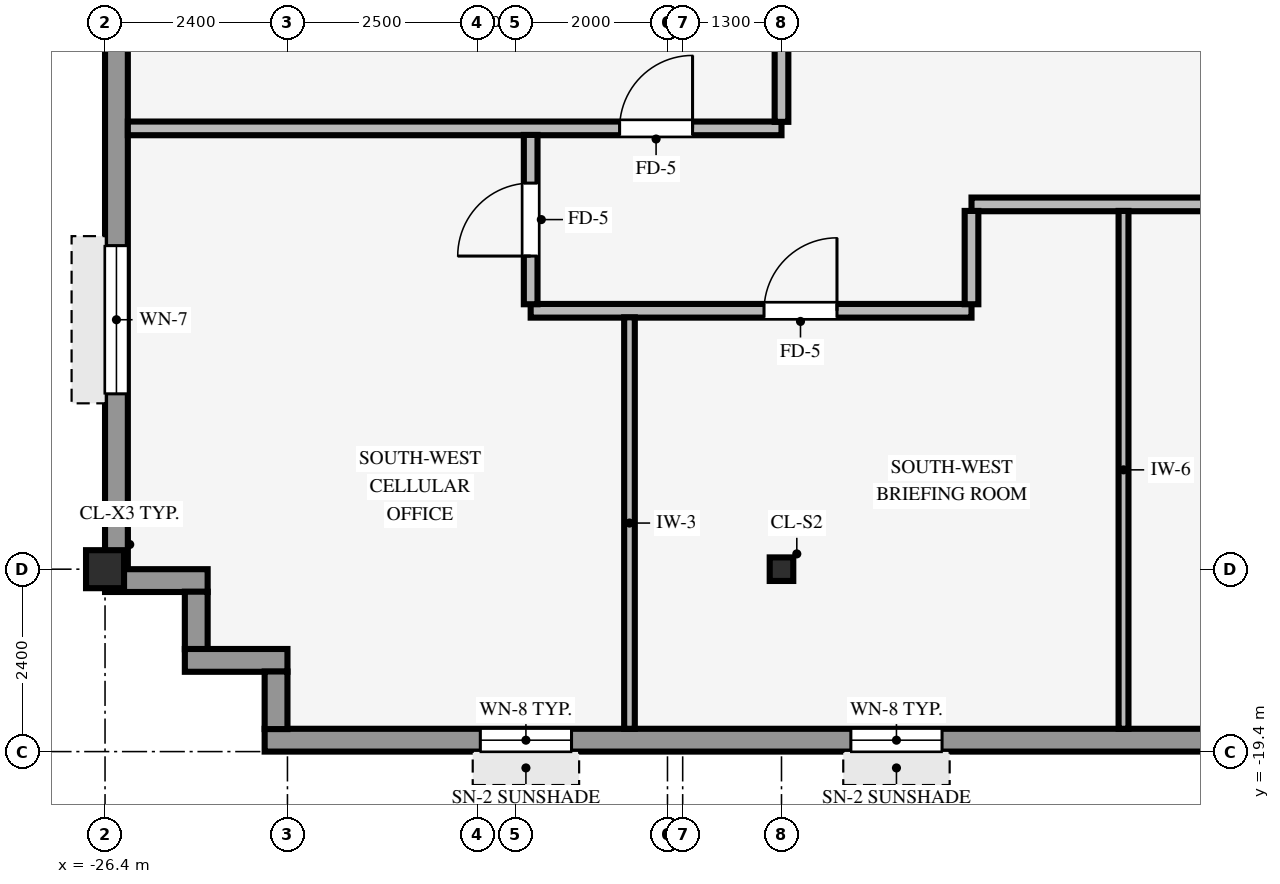
"""IFC4 building model, lengths in metres.
Left out: names, types, materials, properties, quantities, classifications, styles, units other than length and angle.
Written with IfcOpenShell. Run it as: python <this file> out.ifc"""

import sys

from ifc_helpers import new_model, si_unit, direction, frame, frame_2d, origin, origin_2d, place, context, subcontext, project, spatial, rectangle, hollow_rectangle, i_section, extrude, source, transform, mapped, element, fill, save


model = new_model("IFC4")
c1 = context("Model", 3, precision=1e-05, world=origin(), true_north=direction((0.0, 1.0)))
c2 = subcontext(c1, "Body", "Model", "MODEL_VIEW")
j1 = project(units=[si_unit("LENGTHUNIT", "METRE"), si_unit("PLANEANGLEUNIT", "RADIAN")], contexts=[c1])
p1 = place(None, origin())
s1 = spatial("IfcSite", under=j1, at=p1, CompositionType="ELEMENT")
p2 = place(p1, origin())
s2 = spatial("IfcBuilding", under=s1, at=p2, CompositionType="ELEMENT")
p3 = place(p2, frame((0.0, 0.0, 238.35)))
s3 = spatial("IfcBuildingStorey", under=s2, at=p3, CompositionType="ELEMENT", Elevation=238.35)
p4 = place(p3, frame((-26.4, -17.0, 0.0), z_axis=(0.0, 0.0, 1.0), x_axis=(1.0, 0.0, 0.0)))
e1 = element("IfcColumn", 1, at=p4, inside=s3, PredefinedType="COLUMN", context=c2, shape_type="SweptSolid", body=[
    extrude(hollow_rectangle(XDim=0.5, YDim=0.5, WallThickness=0.032, InnerFilletRadius=0.032, OuterFilletRadius=0.064, at=origin_2d()), origin(), (0.0, 0.0, 1.0), 3.37),
])
p5 = place(p3, frame((-17.5, -17.0, 0.0), z_axis=(0.0, 0.0, 1.0), x_axis=(1.0, 0.0, 0.0)))
e2 = element("IfcColumn", 2, at=p5, inside=s3, PredefinedType="COLUMN", context=c2, shape_type="SweptSolid", body=[
    extrude(i_section(OverallWidth=0.31, OverallDepth=0.31, WebThickness=0.015, FlangeThickness=0.015, FilletRadius=0.015, at=origin_2d()), origin(), (0.0, 0.0, 1.0), 3.37),
])
p6 = place(p3, frame((-24.3, -19.25, 0.0), z_axis=(0.0, 0.0, 1.0), x_axis=(1.0, 0.0, 0.0)))
e3 = element("IfcWall", 3, at=p6, inside=s3, PredefinedType="STANDARD", context=c2, shape_type="SweptSolid", body=[
    extrude(rectangle(XDim=41.0, YDim=0.3, at=frame_2d((20.5, 0.0))), origin(), (0.0, 0.0, 1.0), 2.705),
])
p7 = place(p6, frame((2.837, 0.0, 0.8)))
e4 = element("IfcOpeningElement", 4, at=p7, cuts=e3, PredefinedType="OPENING", context=c2, shape_type="SweptSolid", body=[
    extrude(rectangle(XDim=1.2, YDim=1.48, at=frame_2d((0.6, 0.74))), frame((0.0, 0.16, 0.0), z_axis=(0.0, -1.0, 0.0), x_axis=(1.0, 0.0, 0.0)), (0.0, 0.0, 1.0), 0.32),
])
p8 = place(p6, frame((7.712, 0.0, 0.8)))
e5 = element("IfcOpeningElement", 5, at=p8, cuts=e3, PredefinedType="OPENING", context=c2, shape_type="SweptSolid", body=[
    extrude(rectangle(XDim=1.2, YDim=1.48, at=frame_2d((0.6, 0.74))), frame((0.0, 0.16, 0.0), z_axis=(0.0, -1.0, 0.0), x_axis=(1.0, 0.0, 0.0)), (0.0, 0.0, 1.0), 0.32),
])
p9 = place(p6, frame((12.587, 0.0, 0.8)))
e6 = element("IfcOpeningElement", 6, at=p9, cuts=e3, PredefinedType="OPENING", context=c2, shape_type="SweptSolid", body=[
    extrude(rectangle(XDim=1.2, YDim=1.48, at=frame_2d((0.6, 0.74))), frame((0.0, 0.16, 0.0), z_axis=(0.0, -1.0, 0.0), x_axis=(1.0, 0.0, 0.0)), (0.0, 0.0, 1.0), 0.32),
])
p10 = place(p6, frame((18.363, 0.0, 0.8)))
e7 = element("IfcOpeningElement", 7, at=p10, cuts=e3, PredefinedType="OPENING", context=c2, shape_type="SweptSolid", body=[
    extrude(rectangle(XDim=1.2, YDim=1.48, at=frame_2d((0.6, 0.74))), frame((0.0, 0.16, 0.0), z_axis=(0.0, -1.0, 0.0), x_axis=(1.0, 0.0, 0.0)), (0.0, 0.0, 1.0), 0.32),
])
p11 = place(p6, frame((21.887, 0.0, 0.8)))
e8 = element("IfcOpeningElement", 8, at=p11, cuts=e3, PredefinedType="OPENING", context=c2, shape_type="SweptSolid", body=[
    extrude(rectangle(XDim=1.2, YDim=1.48, at=frame_2d((0.6, 0.74))), frame((0.0, 0.16, 0.0), z_axis=(0.0, -1.0, 0.0), x_axis=(1.0, 0.0, 0.0)), (0.0, 0.0, 1.0), 0.32),
])
p12 = place(p6, frame((27.212, 0.0, 0.8)))
e9 = element("IfcOpeningElement", 9, at=p12, cuts=e3, PredefinedType="OPENING", context=c2, shape_type="SweptSolid", body=[
    extrude(rectangle(XDim=1.2, YDim=1.48, at=frame_2d((0.6, 0.74))), frame((0.0, 0.16, 0.0), z_axis=(0.0, -1.0, 0.0), x_axis=(1.0, 0.0, 0.0)), (0.0, 0.0, 1.0), 0.32),
])
p13 = place(p6, frame((31.188, 0.0, 0.8)))
e10 = element("IfcOpeningElement", 10, at=p13, cuts=e3, PredefinedType="OPENING", context=c2, shape_type="SweptSolid", body=[
    extrude(rectangle(XDim=1.2, YDim=1.48, at=frame_2d((0.6, 0.74))), frame((0.0, 0.16, 0.0), z_axis=(0.0, -1.0, 0.0), x_axis=(1.0, 0.0, 0.0)), (0.0, 0.0, 1.0), 0.32),
])
p14 = place(p6, frame((36.962, 0.0, 0.8)))
e11 = element("IfcOpeningElement", 11, at=p14, cuts=e3, PredefinedType="OPENING", context=c2, shape_type="SweptSolid", body=[
    extrude(rectangle(XDim=1.2, YDim=1.48, at=frame_2d((0.6, 0.74))), frame((0.0, 0.16, 0.0), z_axis=(0.0, -1.0, 0.0), x_axis=(1.0, 0.0, 0.0)), (0.0, 0.0, 1.0), 0.32),
])
p15 = place(p3, frame((-26.25, -17.004, 0.0), z_axis=(0.0, 0.0, 1.0), x_axis=(0.0, 1.0, 0.0)))
e12 = element("IfcWall", 12, at=p15, inside=s3, PredefinedType="STANDARD", context=c2, shape_type="SweptSolid", body=[
    extrude(rectangle(XDim=34.008, YDim=0.3, at=frame_2d((17.004, 0.0))), origin(), (0.0, 0.0, 1.0), 2.705),
])
p16 = place(p15, frame((2.311, 0.0, 0.8)))
e13 = element("IfcOpeningElement", 13, at=p16, cuts=e12, PredefinedType="OPENING", context=c2, shape_type="SweptSolid", body=[
    extrude(rectangle(XDim=1.95, YDim=1.48, at=frame_2d((0.975, 0.74))), frame((0.0, 0.16, 0.0), z_axis=(0.0, -1.0, 0.0), x_axis=(1.0, 0.0, 0.0)), (0.0, 0.0, 1.0), 0.32),
])
p17 = place(p15, frame((8.234, 0.0, 0.8)))
e14 = element("IfcOpeningElement", 14, at=p17, cuts=e12, PredefinedType="OPENING", context=c2, shape_type="SweptSolid", body=[
    extrude(rectangle(XDim=1.95, YDim=1.48, at=frame_2d((0.975, 0.74))), frame((0.0, 0.16, 0.0), z_axis=(0.0, -1.0, 0.0), x_axis=(1.0, 0.0, 0.0)), (0.0, 0.0, 1.0), 0.32),
])
p18 = place(p15, frame((11.456, 0.0, 0.8)))
e15 = element("IfcOpeningElement", 15, at=p18, cuts=e12, PredefinedType="OPENING", context=c2, shape_type="SweptSolid", body=[
    extrude(rectangle(XDim=1.95, YDim=1.48, at=frame_2d((0.975, 0.74))), frame((0.0, 0.16, 0.0), z_axis=(0.0, -1.0, 0.0), x_axis=(1.0, 0.0, 0.0)), (0.0, 0.0, 1.0), 0.32),
])
p19 = place(p15, frame((20.602, 0.0, 0.8)))
e16 = element("IfcOpeningElement", 16, at=p19, cuts=e12, PredefinedType="OPENING", context=c2, shape_type="SweptSolid", body=[
    extrude(rectangle(XDim=1.95, YDim=1.48, at=frame_2d((0.975, 0.74))), frame((0.0, 0.16, 0.0), z_axis=(0.0, -1.0, 0.0), x_axis=(1.0, 0.0, 0.0)), (0.0, 0.0, 1.0), 0.32),
])
p20 = place(p15, frame((23.824, 0.0, 0.8)))
e17 = element("IfcOpeningElement", 17, at=p20, cuts=e12, PredefinedType="OPENING", context=c2, shape_type="SweptSolid", body=[
    extrude(rectangle(XDim=1.95, YDim=1.48, at=frame_2d((0.975, 0.74))), frame((0.0, 0.16, 0.0), z_axis=(0.0, -1.0, 0.0), x_axis=(1.0, 0.0, 0.0)), (0.0, 0.0, 1.0), 0.32),
])
p21 = place(p15, frame((29.747, 0.0, 0.8)))
e18 = element("IfcOpeningElement", 18, at=p21, cuts=e12, PredefinedType="OPENING", context=c2, shape_type="SweptSolid", body=[
    extrude(rectangle(XDim=1.95, YDim=1.48, at=frame_2d((0.975, 0.74))), frame((0.0, 0.16, 0.0), z_axis=(0.0, -1.0, 0.0), x_axis=(1.0, 0.0, 0.0)), (0.0, 0.0, 1.0), 0.32),
])
p22 = place(p3, frame((-26.4, -17.15, 0.0), z_axis=(0.0, 0.0, 1.0), x_axis=(1.0, 0.0, 0.0)))
e19 = element("IfcWall", 19, at=p22, inside=s3, PredefinedType="STANDARD", context=c2, shape_type="SweptSolid", body=[
    extrude(rectangle(XDim=1.35, YDim=0.3, at=frame_2d((0.675, 0.0))), origin(), (0.0, 0.0, 1.0), 2.892),
])
p23 = place(p3, frame((-25.2, -18.054, 0.0), z_axis=(0.0, 0.0, 1.0), x_axis=(0.0, 1.0, 0.0)))
e20 = element("IfcWall", 20, at=p23, inside=s3, PredefinedType="STANDARD", context=c2, shape_type="SweptSolid", body=[
    extrude(rectangle(XDim=0.758, YDim=0.3, at=frame_2d((0.379, 0.0))), origin(), (0.0, 0.0, 1.0), 2.892),
])
p24 = place(p3, frame((-25.35, -18.2, 0.0), z_axis=(0.0, 0.0, 1.0), x_axis=(1.0, 0.0, 0.0)))
e21 = element("IfcWall", 21, at=p24, inside=s3, PredefinedType="STANDARD", context=c2, shape_type="SweptSolid", body=[
    extrude(rectangle(XDim=1.35, YDim=0.3, at=frame_2d((0.675, 0.0))), origin(), (0.0, 0.0, 1.0), 2.892),
])
p25 = place(p3, frame((-24.15, -19.104, 0.0), z_axis=(0.0, 0.0, 1.0), x_axis=(0.0, 1.0, 0.0)))
e22 = element("IfcWall", 22, at=p25, inside=s3, PredefinedType="STANDARD", context=c2, shape_type="SweptSolid", body=[
    extrude(rectangle(XDim=0.758, YDim=0.3, at=frame_2d((0.379, 0.0))), origin(), (0.0, 0.0, 1.0), 2.892),
])
p26 = place(p3, frame((-20.8, -13.6, 0.0), z_axis=(0.0, 0.0, 1.0), x_axis=(1.0, 0.0, 0.0)))
e23 = element("IfcWall", 23, at=p26, inside=s3, PredefinedType="PARTITIONING", context=c2, shape_type="SweptSolid", body=[
    extrude(rectangle(XDim=5.8, YDim=0.18, at=frame_2d((2.9, 0.0))), origin(), (0.0, 0.0, 1.0), 3.049),
])
p27 = place(p26, frame((3.07, 0.0, 0.0)))
e24 = element("IfcOpeningElement", 24, at=p27, cuts=e23, PredefinedType="OPENING", context=c2, shape_type="SweptSolid", body=[
    extrude(rectangle(XDim=0.96, YDim=2.1, at=frame_2d((0.48, 1.05))), frame((0.0, 0.1, 0.0), z_axis=(0.0, -1.0, 0.0), x_axis=(1.0, 0.0, 0.0)), (0.0, 0.0, 1.0), 0.2),
])
p28 = place(p3, frame((-15.0, -12.2, 0.0), z_axis=(0.0, 0.0, 1.0), x_axis=(1.0, 0.0, 0.0)))
e25 = element("IfcWall", 25, at=p28, inside=s3, PredefinedType="PARTITIONING", context=c2, shape_type="SweptSolid", body=[
    extrude(rectangle(XDim=6.0, YDim=0.18, at=frame_2d((3.0, 0.0))), origin(), (0.0, 0.0, 1.0), 3.36),
])
p29 = place(p28, frame((3.52, 0.0, 0.0)))
e26 = element("IfcOpeningElement", 26, at=p29, cuts=e25, PredefinedType="OPENING", context=c2, shape_type="SweptSolid", body=[
    extrude(rectangle(XDim=0.96, YDim=2.1, at=frame_2d((0.48, 1.05))), frame((0.0, 0.1, 0.0), z_axis=(0.0, -1.0, 0.0), x_axis=(1.0, 0.0, 0.0)), (0.0, 0.0, 1.0), 0.2),
])
p30 = place(p3, frame((-26.1, -11.2, 0.0), z_axis=(0.0, 0.0, 1.0), x_axis=(1.0, 0.0, 0.0)))
e27 = element("IfcWall", 27, at=p30, inside=s3, PredefinedType="PARTITIONING", context=c2, shape_type="SweptSolid", body=[
    extrude(rectangle(XDim=8.6, YDim=0.18, at=frame_2d((4.3, 0.0))), origin(), (0.0, 0.0, 1.0), 3.36),
])
p31 = place(p30, frame((6.47, 0.0, 0.0)))
e28 = element("IfcOpeningElement", 28, at=p31, cuts=e27, PredefinedType="OPENING", context=c2, shape_type="SweptSolid", body=[
    extrude(rectangle(XDim=0.96, YDim=2.1, at=frame_2d((0.48, 1.05))), frame((0.0, 0.1, 0.0), z_axis=(0.0, -1.0, 0.0), x_axis=(1.0, 0.0, 0.0)), (0.0, 0.0, 1.0), 0.2),
])
p32 = place(p3, frame((-20.8, -13.514, 0.0), z_axis=(0.0, 0.0, 1.0), x_axis=(0.0, 1.0, 0.0)))
e29 = element("IfcWall", 29, at=p32, inside=s3, PredefinedType="PARTITIONING", context=c2, shape_type="SweptSolid", body=[
    extrude(rectangle(XDim=2.228, YDim=0.18, at=frame_2d((1.114, 0.0))), origin(), (0.0, 0.0, 1.0), 3.36),
])
p33 = place(p32, frame((0.634, 0.0, 0.0)))
e30 = element("IfcOpeningElement", 30, at=p33, cuts=e29, PredefinedType="OPENING", context=c2, shape_type="SweptSolid", body=[
    extrude(rectangle(XDim=0.96, YDim=2.1, at=frame_2d((0.48, 1.05))), frame((0.0, 0.1, 0.0), z_axis=(0.0, -1.0, 0.0), x_axis=(1.0, 0.0, 0.0)), (0.0, 0.0, 1.0), 0.2),
])
p34 = place(p3, frame((-19.5, -19.1, 0.0), z_axis=(0.0, 0.0, 1.0), x_axis=(0.0, 1.0, 0.0)))
e31 = element("IfcWall", 31, at=p34, inside=s3, PredefinedType="PARTITIONING", context=c2, shape_type="SweptSolid", body=[
    extrude(rectangle(XDim=5.414, YDim=0.14, at=frame_2d((2.707, 0.0))), origin(), (0.0, 0.0, 1.0), 3.36),
])
p35 = place(p3, frame((-17.5, -11.114, 0.0), z_axis=(0.0, 0.0, 1.0), x_axis=(0.0, 1.0, 0.0)))
e32 = element("IfcWall", 32, at=p35, inside=s3, PredefinedType="PARTITIONING", context=c2, shape_type="SweptSolid", body=[
    extrude(rectangle(XDim=1.118, YDim=0.18, at=frame_2d((0.559, 0.0))), origin(), (0.0, 0.0, 1.0), 2.892),
])
p36 = place(p3, frame((-15.0, -13.514, 0.0), z_axis=(0.0, 0.0, 1.0), x_axis=(0.0, 1.0, 0.0)))
e33 = element("IfcWall", 33, at=p36, inside=s3, PredefinedType="PARTITIONING", context=c2, shape_type="SweptSolid", body=[
    extrude(rectangle(XDim=1.228, YDim=0.18, at=frame_2d((0.614, 0.0))), origin(), (0.0, 0.0, 1.0), 3.36),
])
p37 = place(p3, frame((-13.0, -19.1, 0.0), z_axis=(0.0, 0.0, 1.0), x_axis=(0.0, 1.0, 0.0)))
e34 = element("IfcWall", 34, at=p37, inside=s3, PredefinedType="PARTITIONING", context=c2, shape_type="SweptSolid", body=[
    extrude(rectangle(XDim=6.814, YDim=0.13, at=frame_2d((3.407, 0.0))), origin(), (0.0, 0.0, 1.0), 3.36),
])
m1 = source(origin(), c2, "Body", "SweptSolid", [
    extrude(rectangle(XDim=1.2, YDim=1.48, at=frame_2d((0.6, 0.74))), frame((0.0, 0.03, 0.0), z_axis=(0.0, -1.0, 0.0), x_axis=(1.0, 0.0, 0.0)), (0.0, 0.0, 1.0), 0.06),
])
p38 = place(p7, origin())
e35 = element("IfcWindow", 35, at=p38, inside=s3, PartitioningType="SINGLE_PANEL", PredefinedType="WINDOW", context=c2, shape_type="MappedRepresentation", body=[
    mapped(m1, transform((0.0, 0.0, 0.0), scale=1.0)),
])
fill(e4, e35)
p39 = place(p8, origin())
e36 = element("IfcWindow", 36, at=p39, inside=s3, PartitioningType="SINGLE_PANEL", PredefinedType="WINDOW", context=c2, shape_type="MappedRepresentation", body=[
    mapped(m1, transform((0.0, 0.0, 0.0), scale=1.0)),
])
fill(e5, e36)
m2 = source(origin(), c2, "Body", "SweptSolid", [
    extrude(rectangle(XDim=1.95, YDim=1.48, at=frame_2d((0.975, 0.74))), frame((0.0, 0.03, 0.0), z_axis=(0.0, -1.0, 0.0), x_axis=(1.0, 0.0, 0.0)), (0.0, 0.0, 1.0), 0.06),
])
p40 = place(p16, origin())
e37 = element("IfcWindow", 37, at=p40, inside=s3, PartitioningType="SINGLE_PANEL", PredefinedType="WINDOW", context=c2, shape_type="MappedRepresentation", body=[
    mapped(m2, transform((0.0, 0.0, 0.0), scale=1.0)),
])
fill(e13, e37)
m3 = source(origin(), c2, "Body", "SweptSolid", [
    extrude(rectangle(XDim=0.96, YDim=2.1, at=frame_2d((0.48, 1.05))), frame((0.0, 0.025, 0.0), z_axis=(0.0, -1.0, 0.0), x_axis=(1.0, 0.0, 0.0)), (0.0, 0.0, 1.0), 0.05),
])
p41 = place(p27, origin())
e38 = element("IfcDoor", 38, at=p41, inside=s3, OperationType="SINGLE_SWING_RIGHT", PredefinedType="DOOR", context=c2, shape_type="MappedRepresentation", body=[
    mapped(m3, transform((0.0, 0.0, 0.0), scale=1.0)),
])
fill(e24, e38)
p42 = place(p31, origin())
e39 = element("IfcDoor", 39, at=p42, inside=s3, OperationType="SINGLE_SWING_RIGHT", PredefinedType="DOOR", context=c2, shape_type="MappedRepresentation", body=[
    mapped(m3, transform((0.0, 0.0, 0.0), scale=1.0)),
])
fill(e28, e39)
p43 = place(p33, origin())
e40 = element("IfcDoor", 40, at=p43, inside=s3, OperationType="SINGLE_SWING_LEFT", PredefinedType="DOOR", context=c2, shape_type="MappedRepresentation", body=[
    mapped(m3, transform((0.0, 0.0, 0.0), scale=1.0)),
])
fill(e30, e40)
save(model, sys.argv[1])
